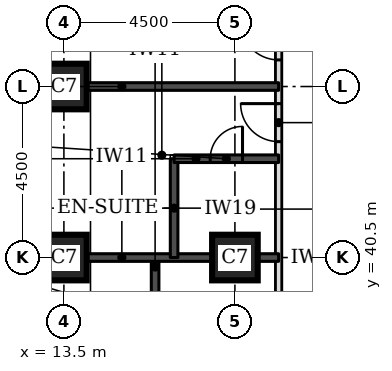
"""IFC4 building model, lengths in metres.
Left out: names, types, materials, properties, quantities, classifications, styles, units other than length and angle.
Written with IfcOpenShell. Run it as: python <this file> out.ifc"""

import sys

from ifc_helpers import new_model, si_unit, direction, frame, frame_2d, origin, origin_2d, place, context, subcontext, project, spatial, rectangle, extrude, element, fill, save


model = new_model("IFC4")
c1 = context("Model", 3, precision=1e-05, world=origin(), true_north=direction((0.0, 1.0)))
c2 = subcontext(c1, "Body", "Model", "MODEL_VIEW")
j1 = project(units=[si_unit("LENGTHUNIT", "METRE"), si_unit("PLANEANGLEUNIT", "RADIAN")], contexts=[c1])
p1 = place(None, origin())
s1 = spatial("IfcSite", under=j1, at=p1, CompositionType="ELEMENT")
p2 = place(p1, origin())
s2 = spatial("IfcBuilding", under=s1, at=p2, CompositionType="ELEMENT")
p3 = place(p2, frame((0.0, 0.0, 59.4)))
s3 = spatial("IfcBuildingStorey", under=s2, at=p3, CompositionType="ELEMENT", Elevation=59.4)
for number, where, z_axis, x_axis in (
    (1, (13.5, 40.5, 0.0), (0.0, 0.0, 1.0), (1.0, 0.0, 0.0)),
    (2, (18.0, 40.5, 0.0), (0.0, 0.0, 1.0), (1.0, 0.0, 0.0)),
    (3, (13.5, 45.0, 0.0), (0.0, 0.0, 1.0), (1.0, 0.0, 0.0)),
):
    element("IfcColumn", number, at=place(p3, frame(where, z_axis=z_axis, x_axis=x_axis)), inside=s3, PredefinedType="COLUMN", context=c2, shape_type="SweptSolid", body=[
        extrude(rectangle(XDim=1.2, YDim=1.2, at=origin_2d()), origin(), (0.0, 0.0, 1.0), 3.3),
    ])
p4 = place(p3, frame((19.15, 25.15, 0.0), z_axis=(0.0, 0.0, 1.0), x_axis=(0.0, 1.0, 0.0)))
e4 = element("IfcWall", 4, at=p4, inside=s3, PredefinedType="PARTITIONING", context=c2, shape_type="SweptSolid", body=[
    extrude(rectangle(XDim=24.35, YDim=0.15, at=frame_2d((12.175, 0.0))), origin(), (0.0, 0.0, 1.0), 3.08),
])
p5 = place(p4, frame((0.4, 0.0, 0.0)))
e5 = element("IfcOpeningElement", 5, at=p5, cuts=e4, PredefinedType="OPENING", context=c2, shape_type="SweptSolid", body=[
    extrude(rectangle(XDim=1.0, YDim=2.1, at=frame_2d((0.5, 1.05))), frame((0.0, 0.085, 0.0), z_axis=(0.0, -1.0, 0.0), x_axis=(1.0, 0.0, 0.0)), (0.0, 0.0, 1.0), 0.17),
])
p6 = place(p4, frame((2.55, 0.0, 0.0)))
e6 = element("IfcOpeningElement", 6, at=p6, cuts=e4, PredefinedType="OPENING", context=c2, shape_type="SweptSolid", body=[
    extrude(rectangle(XDim=1.0, YDim=2.1, at=frame_2d((0.5, 1.05))), frame((0.0, 0.085, 0.0), z_axis=(0.0, -1.0, 0.0), x_axis=(1.0, 0.0, 0.0)), (0.0, 0.0, 1.0), 0.17),
])
p7 = place(p4, frame((9.4, 0.0, 0.0)))
e7 = element("IfcOpeningElement", 7, at=p7, cuts=e4, PredefinedType="OPENING", context=c2, shape_type="SweptSolid", body=[
    extrude(rectangle(XDim=1.0, YDim=2.1, at=frame_2d((0.5, 1.05))), frame((0.0, 0.085, 0.0), z_axis=(0.0, -1.0, 0.0), x_axis=(1.0, 0.0, 0.0)), (0.0, 0.0, 1.0), 0.17),
])
p8 = place(p4, frame((11.55, 0.0, 0.0)))
e8 = element("IfcOpeningElement", 8, at=p8, cuts=e4, PredefinedType="OPENING", context=c2, shape_type="SweptSolid", body=[
    extrude(rectangle(XDim=1.0, YDim=2.1, at=frame_2d((0.5, 1.05))), frame((0.0, 0.085, 0.0), z_axis=(0.0, -1.0, 0.0), x_axis=(1.0, 0.0, 0.0)), (0.0, 0.0, 1.0), 0.17),
])
p9 = place(p4, frame((18.4, 0.0, 0.0)))
e9 = element("IfcOpeningElement", 9, at=p9, cuts=e4, PredefinedType="OPENING", context=c2, shape_type="SweptSolid", body=[
    extrude(rectangle(XDim=1.0, YDim=2.1, at=frame_2d((0.5, 1.05))), frame((0.0, 0.085, 0.0), z_axis=(0.0, -1.0, 0.0), x_axis=(1.0, 0.0, 0.0)), (0.0, 0.0, 1.0), 0.17),
])
p10 = place(p4, frame((20.55, 0.0, 0.0)))
e10 = element("IfcOpeningElement", 10, at=p10, cuts=e4, PredefinedType="OPENING", context=c2, shape_type="SweptSolid", body=[
    extrude(rectangle(XDim=1.0, YDim=2.1, at=frame_2d((0.5, 1.05))), frame((0.0, 0.085, 0.0), z_axis=(0.0, -1.0, 0.0), x_axis=(1.0, 0.0, 0.0)), (0.0, 0.0, 1.0), 0.17),
])
p11 = place(p3, frame((15.9, 38.4, 0.0), z_axis=(0.0, 0.0, 1.0), x_axis=(0.0, 1.0, 0.0)))
e11 = element("IfcWall", 11, at=p11, inside=s3, PredefinedType="SOLIDWALL", context=c2, shape_type="SweptSolid", body=[
    extrude(rectangle(XDim=2.1, YDim=0.2, at=frame_2d((1.05, 0.0))), origin(), (0.0, 0.0, 1.0), 3.08),
])
p12 = place(p3, frame((14.1, 40.5, 0.0), z_axis=(0.0, 0.0, 1.0), x_axis=(1.0, 0.0, 0.0)))
e12 = element("IfcWall", 12, at=p12, inside=s3, PredefinedType="SOLIDWALL", context=c2, shape_type="SweptSolid", body=[
    extrude(rectangle(XDim=5.05, YDim=0.2, at=frame_2d((2.525, 0.0))), origin(), (0.0, 0.0, 1.0), 3.08),
])
p13 = place(p3, frame((16.4, 40.5, 0.0), z_axis=(0.0, 0.0, 1.0), x_axis=(0.0, 1.0, 0.0)))
e13 = element("IfcWall", 13, at=p13, inside=s3, PredefinedType="SOLIDWALL", context=c2, shape_type="SweptSolid", body=[
    extrude(rectangle(XDim=2.6, YDim=0.2, at=frame_2d((1.3, 0.0))), origin(), (0.0, 0.0, 1.0), 3.08),
])
p14 = place(p3, frame((16.4, 43.1, 0.0), z_axis=(0.0, 0.0, 1.0), x_axis=(1.0, 0.0, 0.0)))
e14 = element("IfcWall", 14, at=p14, inside=s3, PredefinedType="SOLIDWALL", context=c2, shape_type="SweptSolid", body=[
    extrude(rectangle(XDim=2.75, YDim=0.2, at=frame_2d((1.375, 0.0))), origin(), (0.0, 0.0, 1.0), 3.08),
])
p15 = place(p14, frame((0.95, 0.0, 0.0)))
e15 = element("IfcOpeningElement", 15, at=p15, cuts=e14, PredefinedType="OPENING", context=c2, shape_type="SweptSolid", body=[
    extrude(rectangle(XDim=0.85, YDim=2.1, at=frame_2d((0.425, 1.05))), frame((0.0, 0.11, 0.0), z_axis=(0.0, -1.0, 0.0), x_axis=(1.0, 0.0, 0.0)), (0.0, 0.0, 1.0), 0.22),
])
p16 = place(p3, frame((14.1, 45.0, 0.0), z_axis=(0.0, 0.0, 1.0), x_axis=(1.0, 0.0, 0.0)))
e16 = element("IfcWall", 16, at=p16, inside=s3, PredefinedType="SOLIDWALL", context=c2, shape_type="SweptSolid", body=[
    extrude(rectangle(XDim=5.05, YDim=0.2, at=frame_2d((2.525, 0.0))), origin(), (0.0, 0.0, 1.0), 3.08),
])
p17 = place(p9, origin())
e17 = element("IfcDoor", 17, at=p17, inside=s3, OperationType="SINGLE_SWING_RIGHT", PredefinedType="DOOR", context=c2, shape_type="SweptSolid", body=[
    extrude(rectangle(XDim=1.0, YDim=2.1, at=frame_2d((0.5, 1.05))), frame((0.0, 0.025, 0.0), z_axis=(0.0, -1.0, 0.0), x_axis=(1.0, 0.0, 0.0)), (0.0, 0.0, 1.0), 0.05),
])
fill(e9, e17)
p18 = place(p15, origin())
e18 = element("IfcDoor", 18, at=p18, inside=s3, OperationType="SINGLE_SWING_RIGHT", PredefinedType="DOOR", context=c2, shape_type="SweptSolid", body=[
    extrude(rectangle(XDim=0.85, YDim=2.1, at=frame_2d((0.425, 1.05))), frame((0.0, 0.025, 0.0), z_axis=(0.0, -1.0, 0.0), x_axis=(1.0, 0.0, 0.0)), (0.0, 0.0, 1.0), 0.05),
])
fill(e15, e18)
p19 = place(p10, origin())
e19 = element("IfcDoor", 19, at=p19, inside=s3, OperationType="SINGLE_SWING_RIGHT", PredefinedType="DOOR", context=c2, shape_type="SweptSolid", body=[
    extrude(rectangle(XDim=1.0, YDim=2.1, at=frame_2d((0.5, 1.05))), frame((0.0, 0.025, 0.0), z_axis=(0.0, -1.0, 0.0), x_axis=(1.0, 0.0, 0.0)), (0.0, 0.0, 1.0), 0.05),
])
fill(e10, e19)
save(model, sys.argv[1])
